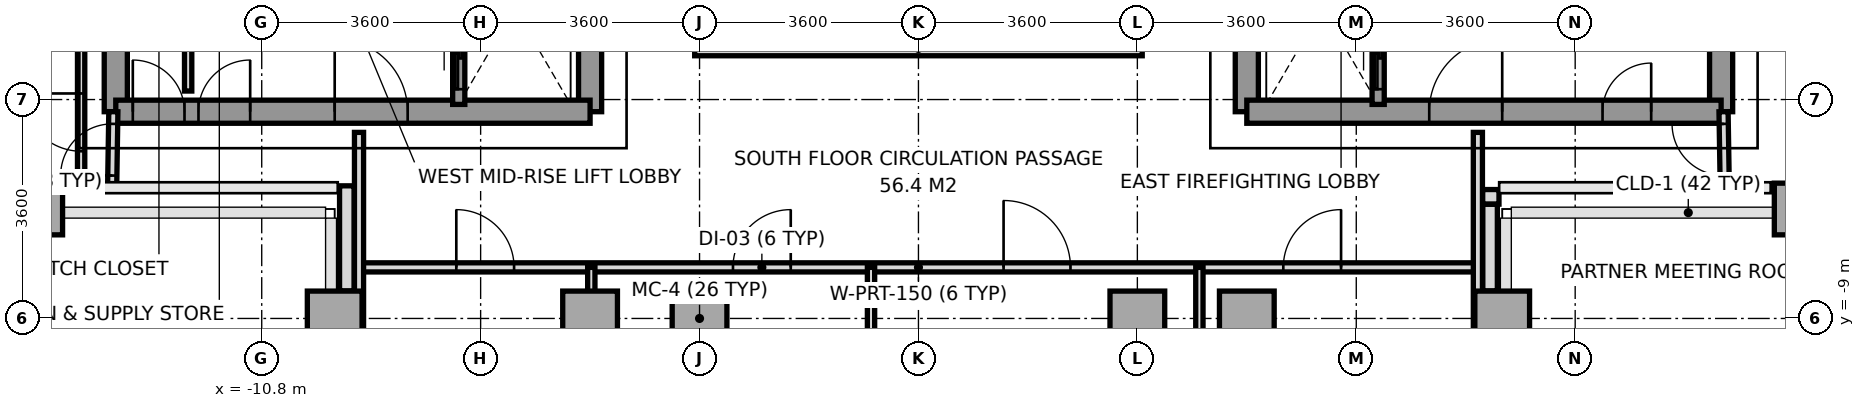
"""IFC4 building model, lengths in metres.
Left out: names, types, materials, properties, quantities, classifications, styles, units other than length and angle.
Written with IfcOpenShell. Run it as: python <this file> out.ifc"""

import sys

from ifc_helpers import new_model, si_unit, direction, frame, frame_2d, origin, origin_2d, place, context, subcontext, project, spatial, rectangle, extrude, source, transform, mapped, element, fill, save


model = new_model("IFC4")
c1 = context("Model", 3, precision=1e-05, world=origin(), true_north=direction((0.0, 1.0)))
c2 = subcontext(c1, "Body", "Model", "MODEL_VIEW")
j1 = project(units=[si_unit("LENGTHUNIT", "METRE"), si_unit("PLANEANGLEUNIT", "RADIAN")], contexts=[c1])
p1 = place(None, origin())
s1 = spatial("IfcSite", under=j1, at=p1, CompositionType="ELEMENT")
p2 = place(p1, origin())
s2 = spatial("IfcBuilding", under=s1, at=p2, CompositionType="ELEMENT")
p3 = place(p2, frame((0.0, 0.0, 163.8)))
s3 = spatial("IfcBuildingStorey", under=s2, at=p3, CompositionType="ELEMENT", Elevation=163.8)
m1 = source(origin(), c2, "Body", "SweptSolid", [
    extrude(rectangle(XDim=0.65, YDim=0.85, at=origin_2d()), origin(), (0.0, 0.0, 1.0), 3.2),
])
p4 = place(p3, frame((-14.4, -7.2, 0.0), z_axis=(0.0, 0.0, 1.0), x_axis=(1.0, 0.0, 0.0)))
e1 = element("IfcColumn", 1, at=p4, inside=s3, PredefinedType="COLUMN", context=c2, shape_type="MappedRepresentation", body=[
    mapped(m1, transform((0.0, 0.0, 0.0), x_axis=(1.0, 0.0, 0.0), y_axis=(0.0, 1.0, 0.0), z_axis=(0.0, 0.0, 1.0), scale=1.0)),
])
m2 = source(origin(), c2, "Body", "SweptSolid", [
    extrude(rectangle(XDim=0.9, YDim=0.9, at=origin_2d()), origin(), (0.0, 0.0, 1.0), 3.2),
])
for number, where, z_axis, x_axis in (
    (2, (-9.6, -9.0, 0.0), (0.0, 0.0, 1.0), (1.0, 0.0, 0.0)),
    (3, (-5.4, -9.0, 0.0), (0.0, 0.0, 1.0), (1.0, 0.0, 0.0)),
    (4, (-3.6, -9.0, 0.0), (0.0, 0.0, 1.0), (1.0, 0.0, 0.0)),
    (5, (3.6, -9.0, 0.0), (0.0, 0.0, 1.0), (1.0, 0.0, 0.0)),
    (6, (5.4, -9.0, 0.0), (0.0, 0.0, 1.0), (1.0, 0.0, 0.0)),
    (7, (9.6, -9.0, 0.0), (0.0, 0.0, 1.0), (1.0, 0.0, 0.0)),
):
    element("IfcColumn", number, at=place(p3, frame(where, z_axis=z_axis, x_axis=x_axis)), inside=s3, PredefinedType="COLUMN", context=c2, shape_type="MappedRepresentation", body=[
        mapped(m2, transform((0.0, 0.0, 0.0), x_axis=(1.0, 0.0, 0.0), y_axis=(0.0, 1.0, 0.0), z_axis=(0.0, 0.0, 1.0), scale=1.0)),
    ])
p5 = place(p3, frame((14.4, -7.2, 0.0), z_axis=(0.0, 0.0, 1.0), x_axis=(1.0, 0.0, 0.0)))
e8 = element("IfcColumn", 8, at=p5, inside=s3, PredefinedType="COLUMN", context=c2, shape_type="MappedRepresentation", body=[
    mapped(m1, transform((0.0, 0.0, 0.0), x_axis=(1.0, 0.0, 0.0), y_axis=(0.0, 1.0, 0.0), z_axis=(0.0, 0.0, 1.0), scale=1.0)),
])
p6 = place(p3, frame((9.547, -7.0, 0.0), z_axis=(0.0, 0.0, 1.0), x_axis=(-1.0, 0.0, 0.0)))
e9 = element("IfcWall", 9, at=p6, inside=s3, PredefinedType="PARAPET", context=c2, shape_type="SweptSolid", body=[
    extrude(rectangle(XDim=0.269, YDim=0.24, at=frame_2d((0.135, 0.0))), origin(), (0.0, 0.0, 1.0), 1.15),
])
p7 = place(p3, frame((9.4, -7.123, 0.0), z_axis=(0.0, 0.0, 1.0), x_axis=(0.0, -1.0, 0.0)))
e10 = element("IfcWall", 10, at=p7, inside=s3, PredefinedType="PARAPET", context=c2, shape_type="SweptSolid", body=[
    extrude(rectangle(XDim=1.424, YDim=0.24, at=frame_2d((0.712, 0.0))), origin(), (0.0, 0.0, 1.0), 1.15),
])
p8 = place(p3, frame((-9.4, -8.547, 0.0), z_axis=(0.0, 0.0, 1.0), x_axis=(0.0, 1.0, 0.0)))
e11 = element("IfcWall", 11, at=p8, inside=s3, PredefinedType="PARAPET", context=c2, shape_type="SweptSolid", body=[
    extrude(rectangle(XDim=1.728, YDim=0.24, at=frame_2d((0.864, 0.0))), origin(), (0.0, 0.0, 1.0), 1.15),
])
p9 = place(p3, frame((-13.2, -5.6, 0.0), z_axis=(0.0, 0.0, 1.0), x_axis=(0.0, 1.0, 0.0)))
e12 = element("IfcWall", 12, at=p9, inside=s3, PredefinedType="SHEAR", context=c2, shape_type="SweptSolid", body=[
    extrude(rectangle(XDim=11.2, YDim=0.38, at=frame_2d((5.6, 0.0))), origin(), (0.0, 0.0, 1.0), 3.2),
])
p10 = place(p3, frame((-5.4, -5.6, 0.0), z_axis=(0.0, 0.0, 1.0), x_axis=(0.0, 1.0, 0.0)))
e13 = element("IfcWall", 13, at=p10, inside=s3, PredefinedType="SHEAR", context=c2, shape_type="SweptSolid", body=[
    extrude(rectangle(XDim=12.5, YDim=0.38, at=frame_2d((6.25, 0.0))), origin(), (0.0, 0.0, 1.0), 3.2),
])
p11 = place(p10, frame((4.55, 0.0, 0.0)))
e14 = element("IfcOpeningElement", 14, at=p11, cuts=e13, PredefinedType="OPENING", context=c2, shape_type="SweptSolid", body=[
    extrude(rectangle(XDim=1.2, YDim=2.2, at=frame_2d((0.6, 1.1))), frame((0.0, 0.2, 0.0), z_axis=(0.0, -1.0, 0.0), x_axis=(1.0, 0.0, 0.0)), (0.0, 0.0, 1.0), 0.4),
])
p12 = place(p10, frame((6.86, 0.0, 0.0)))
e15 = element("IfcOpeningElement", 15, at=p12, cuts=e13, PredefinedType="OPENING", context=c2, shape_type="SweptSolid", body=[
    extrude(rectangle(XDim=0.8, YDim=2.1, at=frame_2d((0.4, 1.05))), frame((0.0, 0.2, 0.0), z_axis=(0.0, -1.0, 0.0), x_axis=(1.0, 0.0, 0.0)), (0.0, 0.0, 1.0), 0.4),
])
p13 = place(p3, frame((-13.2, -5.6, 0.0), z_axis=(0.0, 0.0, 1.0), x_axis=(1.0, 0.0, 0.0)))
e16 = element("IfcWall", 16, at=p13, inside=s3, PredefinedType="SHEAR", context=c2, shape_type="SweptSolid", body=[
    extrude(rectangle(XDim=7.8, YDim=0.38, at=frame_2d((3.9, 0.0))), origin(), (0.0, 0.0, 1.0), 3.2),
])
p14 = place(p13, frame((3.6, 0.0, 0.0)))
e17 = element("IfcOpeningElement", 17, at=p14, cuts=e16, PredefinedType="OPENING", context=c2, shape_type="SweptSolid", body=[
    extrude(rectangle(XDim=1.2, YDim=2.2, at=frame_2d((0.6, 1.1))), frame((0.0, 0.2, 0.0), z_axis=(0.0, -1.0, 0.0), x_axis=(1.0, 0.0, 0.0)), (0.0, 0.0, 1.0), 0.4),
])
p15 = place(p13, frame((0.28, 0.0, 0.0)))
e18 = element("IfcOpeningElement", 18, at=p15, cuts=e16, PredefinedType="OPENING", context=c2, shape_type="SweptSolid", body=[
    extrude(rectangle(XDim=0.85, YDim=2.1, at=frame_2d((0.425, 1.05))), frame((0.0, 0.2, 0.0), z_axis=(0.0, -1.0, 0.0), x_axis=(1.0, 0.0, 0.0)), (0.0, 0.0, 1.0), 0.4),
])
p16 = place(p13, frame((1.36, 0.0, 0.0)))
e19 = element("IfcOpeningElement", 19, at=p16, cuts=e16, PredefinedType="OPENING", context=c2, shape_type="SweptSolid", body=[
    extrude(rectangle(XDim=0.85, YDim=2.1, at=frame_2d((0.425, 1.05))), frame((0.0, 0.2, 0.0), z_axis=(0.0, -1.0, 0.0), x_axis=(1.0, 0.0, 0.0)), (0.0, 0.0, 1.0), 0.4),
])
p17 = place(p3, frame((13.2, -5.6, 0.0), z_axis=(0.0, 0.0, 1.0), x_axis=(0.0, 1.0, 0.0)))
e20 = element("IfcWall", 20, at=p17, inside=s3, PredefinedType="SHEAR", context=c2, shape_type="SweptSolid", body=[
    extrude(rectangle(XDim=11.2, YDim=0.38, at=frame_2d((5.6, 0.0))), origin(), (0.0, 0.0, 1.0), 3.2),
])
p18 = place(p3, frame((5.4, -5.6, 0.0), z_axis=(0.0, 0.0, 1.0), x_axis=(0.0, 1.0, 0.0)))
e21 = element("IfcWall", 21, at=p18, inside=s3, PredefinedType="SHEAR", context=c2, shape_type="SweptSolid", body=[
    extrude(rectangle(XDim=12.5, YDim=0.38, at=frame_2d((6.25, 0.0))), origin(), (0.0, 0.0, 1.0), 3.2),
])
p19 = place(p18, frame((4.55, 0.0, 0.0)))
e22 = element("IfcOpeningElement", 22, at=p19, cuts=e21, PredefinedType="OPENING", context=c2, shape_type="SweptSolid", body=[
    extrude(rectangle(XDim=1.2, YDim=2.2, at=frame_2d((0.6, 1.1))), frame((0.0, 0.2, 0.0), z_axis=(0.0, -1.0, 0.0), x_axis=(1.0, 0.0, 0.0)), (0.0, 0.0, 1.0), 0.4),
])
p20 = place(p18, frame((6.86, 0.0, 0.0)))
e23 = element("IfcOpeningElement", 23, at=p20, cuts=e21, PredefinedType="OPENING", context=c2, shape_type="SweptSolid", body=[
    extrude(rectangle(XDim=0.8, YDim=2.1, at=frame_2d((0.4, 1.05))), frame((0.0, 0.2, 0.0), z_axis=(0.0, -1.0, 0.0), x_axis=(1.0, 0.0, 0.0)), (0.0, 0.0, 1.0), 0.4),
])
p21 = place(p18, frame((7.88, 0.0, 0.0)))
e24 = element("IfcOpeningElement", 24, at=p21, cuts=e21, PredefinedType="OPENING", context=c2, shape_type="SweptSolid", body=[
    extrude(rectangle(XDim=0.8, YDim=2.1, at=frame_2d((0.4, 1.05))), frame((0.0, 0.2, 0.0), z_axis=(0.0, -1.0, 0.0), x_axis=(1.0, 0.0, 0.0)), (0.0, 0.0, 1.0), 0.4),
])
p22 = place(p3, frame((5.4, -5.6, 0.0), z_axis=(0.0, 0.0, 1.0), x_axis=(1.0, 0.0, 0.0)))
e25 = element("IfcWall", 25, at=p22, inside=s3, PredefinedType="SHEAR", context=c2, shape_type="SweptSolid", body=[
    extrude(rectangle(XDim=7.8, YDim=0.38, at=frame_2d((3.9, 0.0))), origin(), (0.0, 0.0, 1.0), 3.2),
])
p23 = place(p22, frame((3.0, 0.0, 0.0)))
e26 = element("IfcOpeningElement", 26, at=p23, cuts=e25, PredefinedType="OPENING", context=c2, shape_type="SweptSolid", body=[
    extrude(rectangle(XDim=1.2, YDim=2.2, at=frame_2d((0.6, 1.1))), frame((0.0, 0.2, 0.0), z_axis=(0.0, -1.0, 0.0), x_axis=(1.0, 0.0, 0.0)), (0.0, 0.0, 1.0), 0.4),
])
p24 = place(p22, frame((5.85, 0.0, 0.0)))
e27 = element("IfcOpeningElement", 27, at=p24, cuts=e25, PredefinedType="OPENING", context=c2, shape_type="SweptSolid", body=[
    extrude(rectangle(XDim=0.8, YDim=2.1, at=frame_2d((0.4, 1.05))), frame((0.0, 0.2, 0.0), z_axis=(0.0, -1.0, 0.0), x_axis=(1.0, 0.0, 0.0)), (0.0, 0.0, 1.0), 0.4),
])
p25 = place(p3, frame((-7.56, -5.48, 0.0), z_axis=(0.0, 0.0, 1.0), x_axis=(0.0, 1.0, 0.0)))
e28 = element("IfcWall", 28, at=p25, inside=s3, PredefinedType="SOLIDWALL", context=c2, shape_type="SweptSolid", body=[
    extrude(rectangle(XDim=1.6, YDim=0.2, at=frame_2d((0.8, 0.0))), origin(), (0.0, 0.0, 1.0), 3.2),
])
p26 = place(p25, frame((0.25, 0.0, 0.0)))
e29 = element("IfcOpeningElement", 29, at=p26, cuts=e28, PredefinedType="OPENING", context=c2, shape_type="SweptSolid", body=[
    extrude(rectangle(XDim=1.1, YDim=2.2, at=frame_2d((0.55, 1.1))), frame((0.0, 0.11, 0.0), z_axis=(0.0, -1.0, 0.0), x_axis=(1.0, 0.0, 0.0)), (0.0, 0.0, 1.0), 0.22),
])
p27 = place(p3, frame((7.56, -5.48, 0.0), z_axis=(0.0, 0.0, 1.0), x_axis=(0.0, 1.0, 0.0)))
e30 = element("IfcWall", 30, at=p27, inside=s3, PredefinedType="SOLIDWALL", context=c2, shape_type="SweptSolid", body=[
    extrude(rectangle(XDim=1.6, YDim=0.2, at=frame_2d((0.8, 0.0))), origin(), (0.0, 0.0, 1.0), 3.2),
])
p28 = place(p27, frame((0.25, 0.0, 0.0)))
e31 = element("IfcOpeningElement", 31, at=p28, cuts=e30, PredefinedType="OPENING", context=c2, shape_type="SweptSolid", body=[
    extrude(rectangle(XDim=1.1, YDim=2.2, at=frame_2d((0.55, 1.1))), frame((0.0, 0.11, 0.0), z_axis=(0.0, -1.0, 0.0), x_axis=(1.0, 0.0, 0.0)), (0.0, 0.0, 1.0), 0.22),
])
p29 = place(p3, frame((-12.01, -5.26, 0.0), z_axis=(0.0, 0.0, 1.0), x_axis=(0.0, 1.0, 0.0)))
e32 = element("IfcWall", 32, at=p29, inside=s3, PredefinedType="PARTITIONING", context=c2, shape_type="SweptSolid", body=[
    extrude(rectangle(XDim=2.94, YDim=0.12, at=frame_2d((1.47, 0.0))), origin(), (0.0, 0.0, 1.0), 3.2),
])
p30 = place(p3, frame((-9.2, -8.16, 0.0), z_axis=(0.0, 0.0, 1.0), x_axis=(1.0, 0.0, 0.0)))
e33 = element("IfcWall", 33, at=p30, inside=s3, PredefinedType="PARTITIONING", context=c2, shape_type="SweptSolid", body=[
    extrude(rectangle(XDim=18.4, YDim=0.15, at=frame_2d((9.2, 0.0))), origin(), (0.0, 0.0, 1.0), 2.8),
])
p31 = place(p30, frame((1.6, 0.0, 0.0)))
e34 = element("IfcOpeningElement", 34, at=p31, cuts=e33, PredefinedType="OPENING", context=c2, shape_type="SweptSolid", body=[
    extrude(rectangle(XDim=0.95, YDim=2.15, at=frame_2d((0.475, 1.075))), frame((0.0, 0.085, 0.0), z_axis=(0.0, -1.0, 0.0), x_axis=(1.0, 0.0, 0.0)), (0.0, 0.0, 1.0), 0.17),
])
p32 = place(p30, frame((6.15, 0.0, 0.0)))
e35 = element("IfcOpeningElement", 35, at=p32, cuts=e33, PredefinedType="OPENING", context=c2, shape_type="SweptSolid", body=[
    extrude(rectangle(XDim=0.95, YDim=2.15, at=frame_2d((0.475, 1.075))), frame((0.0, 0.085, 0.0), z_axis=(0.0, -1.0, 0.0), x_axis=(1.0, 0.0, 0.0)), (0.0, 0.0, 1.0), 0.17),
])
p33 = place(p30, frame((10.6, 0.0, 0.0)))
e36 = element("IfcOpeningElement", 36, at=p33, cuts=e33, PredefinedType="OPENING", context=c2, shape_type="SweptSolid", body=[
    extrude(rectangle(XDim=1.1, YDim=2.2, at=frame_2d((0.55, 1.1))), frame((0.0, 0.085, 0.0), z_axis=(0.0, -1.0, 0.0), x_axis=(1.0, 0.0, 0.0)), (0.0, 0.0, 1.0), 0.17),
])
p34 = place(p30, frame((15.2, 0.0, 0.0)))
e37 = element("IfcOpeningElement", 37, at=p34, cuts=e33, PredefinedType="OPENING", context=c2, shape_type="SweptSolid", body=[
    extrude(rectangle(XDim=0.95, YDim=2.15, at=frame_2d((0.475, 1.075))), frame((0.0, 0.085, 0.0), z_axis=(0.0, -1.0, 0.0), x_axis=(1.0, 0.0, 0.0)), (0.0, 0.0, 1.0), 0.17),
])
for number, where, z_axis, x_axis in (
    (38, (-9.2, -15.68, 0.0), (0.0, 0.0, 1.0), (0.0, 1.0, 0.0)),
    (39, (9.2, -15.68, 0.0), (0.0, 0.0, 1.0), (0.0, 1.0, 0.0)),
):
    element("IfcWall", number, at=place(p3, frame(where, z_axis=z_axis, x_axis=x_axis)), inside=s3, PredefinedType="PARTITIONING", context=c2, shape_type="SweptSolid", body=[
        extrude(rectangle(XDim=9.74, YDim=0.15, at=frame_2d((4.87, 0.0))), origin(), (0.0, 0.0, 1.0), 2.75),
    ])
for number, where, z_axis, x_axis in (
    (40, (-5.38, -24.65, 0.0), (0.0, 0.0, 1.0), (0.0, 1.0, 0.0)),
    (41, (-0.78, -24.65, 0.0), (0.0, 0.0, 1.0), (0.0, 1.0, 0.0)),
    (42, (4.62, -24.65, 0.0), (0.0, 0.0, 1.0), (0.0, 1.0, 0.0)),
):
    element("IfcWall", number, at=place(p3, frame(where, z_axis=z_axis, x_axis=x_axis)), inside=s3, PredefinedType="PARTITIONING", context=c2, shape_type="SweptSolid", body=[
        extrude(rectangle(XDim=16.49, YDim=0.12, at=frame_2d((8.245, 0.0))), origin(), (0.0, 0.0, 1.0), 2.75),
    ])
p35 = place(p3, frame((-13.26, -6.85, 0.0), z_axis=(0.0, 0.0, 1.0), x_axis=(0.016013571389, 0.999871774545, 0.0)))
e43 = element("IfcWall", 43, at=p35, inside=s3, PredefinedType="PARTITIONING", context=c2, shape_type="SweptSolid", body=[
    extrude(rectangle(XDim=1.25, YDim=0.15, at=frame_2d((0.625, 0.0))), origin(), (0.0, 0.0, 1.0), 3.2),
])
p36 = place(p35, frame((0.2, 0.0, 0.0)))
e44 = element("IfcOpeningElement", 44, at=p36, cuts=e43, PredefinedType="OPENING", context=c2, shape_type="SweptSolid", body=[
    extrude(rectangle(XDim=0.85, YDim=2.1, at=frame_2d((0.425, 1.05))), frame((0.0, 0.085, 0.0), z_axis=(0.0, -1.0, 0.0), x_axis=(1.0, 0.0, 0.0)), (0.0, 0.0, 1.0), 0.17),
])
p37 = place(p3, frame((-13.77, -6.85, 0.0), z_axis=(0.0, 0.0, 1.0), x_axis=(0.0, 1.0, 0.0)))
e45 = element("IfcWall", 45, at=p37, inside=s3, PredefinedType="PARTITIONING", context=c2, shape_type="SweptSolid", body=[
    extrude(rectangle(XDim=13.7, YDim=0.12, at=frame_2d((6.85, 0.0))), origin(), (0.0, 0.0, 1.0), 2.87),
])
p38 = place(p37, frame((0.6, 0.0, 0.0)))
e46 = element("IfcOpeningElement", 46, at=p38, cuts=e45, PredefinedType="OPENING", context=c2, shape_type="SweptSolid", body=[
    extrude(rectangle(XDim=0.95, YDim=2.15, at=frame_2d((0.475, 1.075))), frame((0.0, 0.07, 0.0), z_axis=(0.0, -1.0, 0.0), x_axis=(1.0, 0.0, 0.0)), (0.0, 0.0, 1.0), 0.14),
])
p39 = place(p3, frame((13.26, -6.85, 0.0), z_axis=(0.0, 0.0, 1.0), x_axis=(-0.016013571389, 0.999871774545, 0.0)))
e47 = element("IfcWall", 47, at=p39, inside=s3, PredefinedType="PARTITIONING", context=c2, shape_type="SweptSolid", body=[
    extrude(rectangle(XDim=1.25, YDim=0.15, at=frame_2d((0.625, 0.0))), origin(), (0.0, 0.0, 1.0), 3.2),
])
p40 = place(p39, frame((0.2, 0.0, 0.0)))
e48 = element("IfcOpeningElement", 48, at=p40, cuts=e47, PredefinedType="OPENING", context=c2, shape_type="SweptSolid", body=[
    extrude(rectangle(XDim=0.85, YDim=2.1, at=frame_2d((0.425, 1.05))), frame((0.0, 0.085, 0.0), z_axis=(0.0, -1.0, 0.0), x_axis=(1.0, 0.0, 0.0)), (0.0, 0.0, 1.0), 0.17),
])
p41 = place(p3, frame((-3.68, -4.56, 0.0), z_axis=(0.0, 0.0, 1.0), x_axis=(1.0, 0.0, 0.0)))
e49 = element("IfcWall", 49, at=p41, inside=s3, PredefinedType="PARAPET", context=c2, shape_type="SweptSolid", body=[
    extrude(rectangle(XDim=7.36, YDim=0.24, at=frame_2d((3.68, 0.0))), origin(), (0.0, 0.0, 1.0), 1.15),
])
m3 = source(origin(), c2, "Body", "SweptSolid", [
    extrude(rectangle(XDim=1.2, YDim=2.2, at=frame_2d((0.6, 1.1))), frame((0.0, 0.025, 0.0), z_axis=(0.0, -1.0, 0.0), x_axis=(1.0, 0.0, 0.0)), (0.0, 0.0, 1.0), 0.05),
])
p42 = place(p14, origin())
e50 = element("IfcDoor", 50, at=p42, inside=s3, OperationType="SINGLE_SWING_LEFT", PredefinedType="DOOR", context=c2, shape_type="MappedRepresentation", body=[
    mapped(m3, transform((0.0, 0.0, 0.0), x_axis=(1.0, 0.0, 0.0), y_axis=(0.0, 1.0, 0.0), z_axis=(0.0, 0.0, 1.0), scale=1.0)),
])
fill(e17, e50)
p43 = place(p23, origin())
e51 = element("IfcDoor", 51, at=p43, inside=s3, OperationType="SINGLE_SWING_RIGHT", PredefinedType="DOOR", context=c2, shape_type="MappedRepresentation", body=[
    mapped(m3, transform((0.0, 0.0, 0.0), x_axis=(1.0, 0.0, 0.0), y_axis=(0.0, 1.0, 0.0), z_axis=(0.0, 0.0, 1.0), scale=1.0)),
])
fill(e26, e51)
m4 = source(origin(), c2, "Body", "SweptSolid", [
    extrude(rectangle(XDim=0.85, YDim=2.1, at=frame_2d((0.425, 1.05))), frame((0.0, 0.025, 0.0), z_axis=(0.0, -1.0, 0.0), x_axis=(1.0, 0.0, 0.0)), (0.0, 0.0, 1.0), 0.05),
])
p44 = place(p15, origin())
e52 = element("IfcDoor", 52, at=p44, inside=s3, OperationType="SINGLE_SWING_LEFT", PredefinedType="DOOR", context=c2, shape_type="MappedRepresentation", body=[
    mapped(m4, transform((0.0, 0.0, 0.0), x_axis=(1.0, 0.0, 0.0), y_axis=(0.0, 1.0, 0.0), z_axis=(0.0, 0.0, 1.0), scale=1.0)),
])
fill(e18, e52)
p45 = place(p16, origin())
e53 = element("IfcDoor", 53, at=p45, inside=s3, OperationType="SINGLE_SWING_RIGHT", PredefinedType="DOOR", context=c2, shape_type="MappedRepresentation", body=[
    mapped(m4, transform((0.0, 0.0, 0.0), x_axis=(1.0, 0.0, 0.0), y_axis=(0.0, 1.0, 0.0), z_axis=(0.0, 0.0, 1.0), scale=1.0)),
])
fill(e19, e53)
m5 = source(origin(), c2, "Body", "SweptSolid", [
    extrude(rectangle(XDim=0.8, YDim=2.1, at=frame_2d((0.4, 1.05))), frame((0.0, 0.025, 0.0), z_axis=(0.0, -1.0, 0.0), x_axis=(1.0, 0.0, 0.0)), (0.0, 0.0, 1.0), 0.05),
])
p46 = place(p24, origin())
e54 = element("IfcDoor", 54, at=p46, inside=s3, OperationType="SINGLE_SWING_RIGHT", PredefinedType="DOOR", context=c2, shape_type="MappedRepresentation", body=[
    mapped(m5, transform((0.0, 0.0, 0.0), x_axis=(1.0, 0.0, 0.0), y_axis=(0.0, 1.0, 0.0), z_axis=(0.0, 0.0, 1.0), scale=1.0)),
])
fill(e27, e54)
m6 = source(origin(), c2, "Body", "SweptSolid", [
    extrude(rectangle(XDim=1.1, YDim=2.2, at=frame_2d((0.55, 1.1))), frame((0.0, 0.025, 0.0), z_axis=(0.0, -1.0, 0.0), x_axis=(1.0, 0.0, 0.0)), (0.0, 0.0, 1.0), 0.05),
])
p47 = place(p26, origin())
e55 = element("IfcDoor", 55, at=p47, inside=s3, OperationType="SLIDING_TO_LEFT", PredefinedType="DOOR", context=c2, shape_type="MappedRepresentation", body=[
    mapped(m6, transform((0.0, 0.0, 0.0), x_axis=(1.0, 0.0, 0.0), y_axis=(0.0, 1.0, 0.0), z_axis=(0.0, 0.0, 1.0), scale=1.0)),
])
fill(e29, e55)
p48 = place(p28, origin())
e56 = element("IfcDoor", 56, at=p48, inside=s3, OperationType="SLIDING_TO_LEFT", PredefinedType="DOOR", context=c2, shape_type="MappedRepresentation", body=[
    mapped(m6, transform((0.0, 0.0, 0.0), x_axis=(1.0, 0.0, 0.0), y_axis=(0.0, 1.0, 0.0), z_axis=(0.0, 0.0, 1.0), scale=1.0)),
])
fill(e31, e56)
m7 = source(origin(), c2, "Body", "SweptSolid", [
    extrude(rectangle(XDim=0.95, YDim=2.15, at=frame_2d((0.475, 1.075))), frame((0.0, 0.025, 0.0), z_axis=(0.0, -1.0, 0.0), x_axis=(1.0, 0.0, 0.0)), (0.0, 0.0, 1.0), 0.05),
])
p49 = place(p31, origin())
e57 = element("IfcDoor", 57, at=p49, inside=s3, OperationType="SINGLE_SWING_LEFT", PredefinedType="DOOR", context=c2, shape_type="MappedRepresentation", body=[
    mapped(m7, transform((0.0, 0.0, 0.0), x_axis=(1.0, 0.0, 0.0), y_axis=(0.0, 1.0, 0.0), z_axis=(0.0, 0.0, 1.0), scale=1.0)),
])
fill(e34, e57)
p50 = place(p32, origin())
e58 = element("IfcDoor", 58, at=p50, inside=s3, OperationType="SINGLE_SWING_RIGHT", PredefinedType="DOOR", context=c2, shape_type="MappedRepresentation", body=[
    mapped(m7, transform((0.0, 0.0, 0.0), x_axis=(1.0, 0.0, 0.0), y_axis=(0.0, 1.0, 0.0), z_axis=(0.0, 0.0, 1.0), scale=1.0)),
])
fill(e35, e58)
p51 = place(p33, origin())
e59 = element("IfcDoor", 59, at=p51, inside=s3, OperationType="SINGLE_SWING_LEFT", PredefinedType="DOOR", context=c2, shape_type="MappedRepresentation", body=[
    mapped(m6, transform((0.0, 0.0, 0.0), x_axis=(1.0, 0.0, 0.0), y_axis=(0.0, 1.0, 0.0), z_axis=(0.0, 0.0, 1.0), scale=1.0)),
])
fill(e36, e59)
p52 = place(p34, origin())
e60 = element("IfcDoor", 60, at=p52, inside=s3, OperationType="SINGLE_SWING_RIGHT", PredefinedType="DOOR", context=c2, shape_type="MappedRepresentation", body=[
    mapped(m7, transform((0.0, 0.0, 0.0), x_axis=(1.0, 0.0, 0.0), y_axis=(0.0, 1.0, 0.0), z_axis=(0.0, 0.0, 1.0), scale=1.0)),
])
fill(e37, e60)
p53 = place(p38, origin())
e61 = element("IfcDoor", 61, at=p53, inside=s3, OperationType="SINGLE_SWING_RIGHT", PredefinedType="DOOR", context=c2, shape_type="MappedRepresentation", body=[
    mapped(m7, transform((0.0, 0.0, 0.0), x_axis=(1.0, 0.0, 0.0), y_axis=(0.0, 1.0, 0.0), z_axis=(0.0, 0.0, 1.0), scale=1.0)),
])
fill(e46, e61)
p54 = place(p36, origin())
e62 = element("IfcDoor", 62, at=p54, inside=s3, OperationType="SINGLE_SWING_LEFT", PredefinedType="DOOR", context=c2, shape_type="MappedRepresentation", body=[
    mapped(m4, transform((0.0, 0.0, 0.0), x_axis=(1.0, 0.0, 0.0), y_axis=(0.0, 1.0, 0.0), z_axis=(0.0, 0.0, 1.0), scale=1.0)),
])
fill(e44, e62)
p55 = place(p40, origin())
e63 = element("IfcDoor", 63, at=p55, inside=s3, OperationType="SINGLE_SWING_RIGHT", PredefinedType="DOOR", context=c2, shape_type="MappedRepresentation", body=[
    mapped(m4, transform((0.0, 0.0, 0.0), x_axis=(1.0, 0.0, 0.0), y_axis=(0.0, 1.0, 0.0), z_axis=(0.0, 0.0, 1.0), scale=1.0)),
])
fill(e48, e63)
save(model, sys.argv[1])
